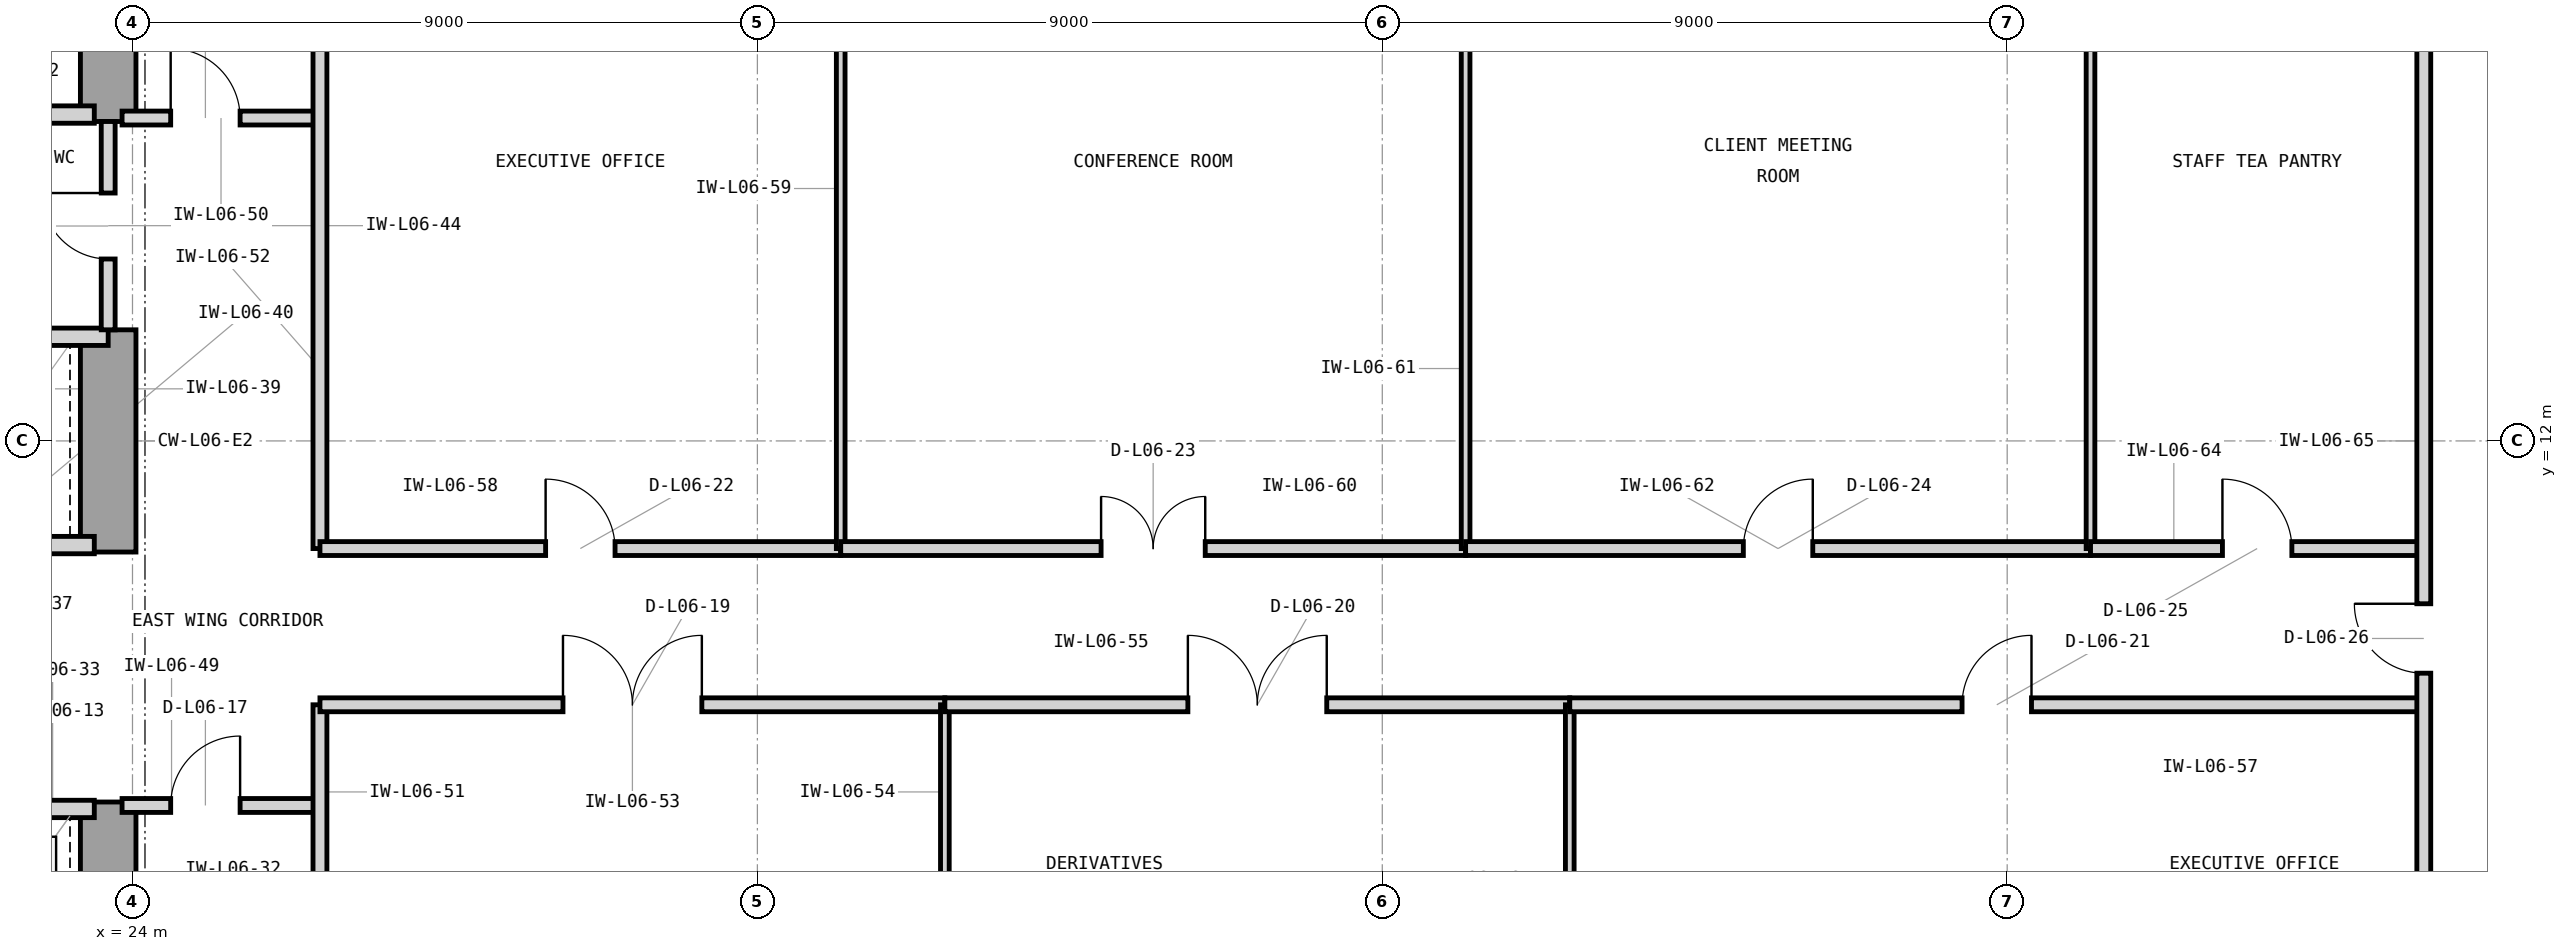
"""IFC4 building model, lengths in metres.
Left out: names, types, materials, properties, quantities, classifications, styles, units other than length and angle.
Written with IfcOpenShell. Run it as: python <this file> out.ifc"""

import sys

from ifc_helpers import new_model, si_unit, direction, frame, frame_2d, origin, place, context, subcontext, project, spatial, rectangle, extrude, element, fill, save


model = new_model("IFC4")
c1 = context("Model", 3, precision=1e-05, world=origin(), true_north=direction((0.0, 1.0)))
c2 = subcontext(c1, "Body", "Model", "MODEL_VIEW")
j1 = project(units=[si_unit("LENGTHUNIT", "METRE"), si_unit("PLANEANGLEUNIT", "RADIAN")], contexts=[c1])
p1 = place(None, origin())
s1 = spatial("IfcSite", under=j1, at=p1, CompositionType="ELEMENT")
p2 = place(p1, origin())
s2 = spatial("IfcBuilding", under=s1, at=p2, CompositionType="ELEMENT")
p3 = place(p2, frame((0.0, 0.0, 30.0)))
s3 = spatial("IfcBuildingStorey", under=s2, at=p3, CompositionType="ELEMENT", Elevation=30.0)
p4 = place(p3, frame((23.65, 3.75, 0.0), z_axis=(0.0, 0.0, 1.0), x_axis=(0.0, 1.0, 0.0)))
e1 = element("IfcWall", 1, at=p4, inside=s3, PredefinedType="SHEAR", context=c2, shape_type="SweptSolid", body=[
    extrude(rectangle(XDim=3.05, YDim=0.8, at=frame_2d((1.525, 0.0))), origin(), (0.0, 0.0, 1.0), 4.2),
])
p5 = place(p3, frame((23.65, 10.4, 0.0), z_axis=(0.0, 0.0, 1.0), x_axis=(0.0, 1.0, 0.0)))
e2 = element("IfcWall", 2, at=p5, inside=s3, PredefinedType="SHEAR", context=c2, shape_type="SweptSolid", body=[
    extrude(rectangle(XDim=3.2, YDim=0.8, at=frame_2d((1.6, 0.0))), origin(), (0.0, 0.0, 1.0), 4.2),
])
p6 = place(p3, frame((23.65, 16.6, 0.0), z_axis=(0.0, 0.0, 1.0), x_axis=(0.0, 1.0, 0.0)))
e3 = element("IfcWall", 3, at=p6, inside=s3, PredefinedType="SHEAR", context=c2, shape_type="SweptSolid", body=[
    extrude(rectangle(XDim=4.05, YDim=0.8, at=frame_2d((2.025, 0.0))), origin(), (0.0, 0.0, 1.0), 4.2),
])
p7 = place(p3, frame((21.05, 16.7, 0.0), z_axis=(0.0, 0.0, 1.0), x_axis=(1.0, 0.0, 0.0)))
e4 = element("IfcWall", 4, at=p7, inside=s3, PredefinedType="PARTITIONING", context=c2, shape_type="SweptSolid", body=[
    extrude(rectangle(XDim=2.4, YDim=0.25, at=frame_2d((1.2, 0.0))), origin(), (0.0, 0.0, 1.0), 3.426),
])
p8 = place(p3, frame((21.05, 6.7, 0.0), z_axis=(0.0, 0.0, 1.0), x_axis=(1.0, 0.0, 0.0)))
e5 = element("IfcWall", 5, at=p8, inside=s3, PredefinedType="PARTITIONING", context=c2, shape_type="SweptSolid", body=[
    extrude(rectangle(XDim=2.4, YDim=0.25, at=frame_2d((1.2, 0.0))), origin(), (0.0, 0.0, 1.0), 3.426),
])
p9 = place(p8, frame((0.48, 0.0, 0.0)))
e6 = element("IfcOpeningElement", 6, at=p9, cuts=e5, PredefinedType="OPENING", context=c2, shape_type="SweptSolid", body=[
    extrude(rectangle(XDim=1.15, YDim=2.25, at=frame_2d((0.575, 1.125))), frame((0.0, 0.135, 0.0), z_axis=(0.0, -1.0, 0.0), x_axis=(1.0, 0.0, 0.0)), (0.0, 0.0, 1.0), 0.27),
])
p10 = place(p3, frame((21.05, 10.5, 0.0), z_axis=(0.0, 0.0, 1.0), x_axis=(1.0, 0.0, 0.0)))
e7 = element("IfcWall", 7, at=p10, inside=s3, PredefinedType="PARTITIONING", context=c2, shape_type="SweptSolid", body=[
    extrude(rectangle(XDim=2.4, YDim=0.25, at=frame_2d((1.2, 0.0))), origin(), (0.0, 0.0, 1.0), 3.426),
])
p11 = place(p3, frame((14.7, 13.5, 0.0), z_axis=(0.0, 0.0, 1.0), x_axis=(1.0, 0.0, 0.0)))
e8 = element("IfcWall", 8, at=p11, inside=s3, PredefinedType="PARTITIONING", context=c2, shape_type="SweptSolid", body=[
    extrude(rectangle(XDim=8.95, YDim=0.25, at=frame_2d((4.475, 0.0))), origin(), (0.0, 0.0, 1.0), 3.426),
])
p12 = place(p3, frame((23.65, 13.6, 0.0), z_axis=(0.0, 0.0, 1.0), x_axis=(0.0, 1.0, 0.0)))
e9 = element("IfcWall", 9, at=p12, inside=s3, PredefinedType="PARTITIONING", context=c2, shape_type="SweptSolid", body=[
    extrude(rectangle(XDim=3.0, YDim=0.2, at=frame_2d((1.5, 0.0))), origin(), (0.0, 0.0, 1.0), 3.97),
])
p13 = place(p12, frame((1.02, 0.0, 0.0)))
e10 = element("IfcOpeningElement", 10, at=p13, cuts=e9, PredefinedType="OPENING", context=c2, shape_type="SweptSolid", body=[
    extrude(rectangle(XDim=0.95, YDim=2.1, at=frame_2d((0.475, 1.05))), frame((0.0, 0.11, 0.0), z_axis=(0.0, -1.0, 0.0), x_axis=(1.0, 0.0, 0.0)), (0.0, 0.0, 1.0), 0.22),
])
p14 = place(p3, frame((23.85, 6.75, 0.0), z_axis=(0.0, 0.0, 1.0), x_axis=(1.0, 0.0, 0.0)))
e11 = element("IfcWall", 11, at=p14, inside=s3, PredefinedType="PARTITIONING", context=c2, shape_type="SweptSolid", body=[
    extrude(rectangle(XDim=2.85, YDim=0.2, at=frame_2d((1.425, 0.0))), origin(), (0.0, 0.0, 1.0), 3.97),
])
p15 = place(p14, frame((0.7, 0.0, 0.0)))
e12 = element("IfcOpeningElement", 12, at=p15, cuts=e11, PredefinedType="OPENING", context=c2, shape_type="SweptSolid", body=[
    extrude(rectangle(XDim=1.0, YDim=2.15, at=frame_2d((0.5, 1.075))), frame((0.0, 0.11, 0.0), z_axis=(0.0, -1.0, 0.0), x_axis=(1.0, 0.0, 0.0)), (0.0, 0.0, 1.0), 0.22),
])
p16 = place(p3, frame((23.85, 16.65, 0.0), z_axis=(0.0, 0.0, 1.0), x_axis=(1.0, 0.0, 0.0)))
e13 = element("IfcWall", 13, at=p16, inside=s3, PredefinedType="PARTITIONING", context=c2, shape_type="SweptSolid", body=[
    extrude(rectangle(XDim=2.85, YDim=0.2, at=frame_2d((1.425, 0.0))), origin(), (0.0, 0.0, 1.0), 3.97),
])
p17 = place(p16, frame((0.7, 0.0, 0.0)))
e14 = element("IfcOpeningElement", 14, at=p17, cuts=e13, PredefinedType="OPENING", context=c2, shape_type="SweptSolid", body=[
    extrude(rectangle(XDim=1.0, YDim=2.15, at=frame_2d((0.5, 1.075))), frame((0.0, 0.11, 0.0), z_axis=(0.0, -1.0, 0.0), x_axis=(1.0, 0.0, 0.0)), (0.0, 0.0, 1.0), 0.22),
])
p18 = place(p3, frame((26.7, 3.18, 0.0), z_axis=(0.0, 0.0, 1.0), x_axis=(0.0, 1.0, 0.0)))
e15 = element("IfcWall", 15, at=p18, inside=s3, PredefinedType="PARTITIONING", context=c2, shape_type="SweptSolid", body=[
    extrude(rectangle(XDim=5.02, YDim=0.2, at=frame_2d((2.51, 0.0))), origin(), (0.0, 0.0, 1.0), 3.97),
])
p19 = place(p3, frame((26.7, 10.45, 0.0), z_axis=(0.0, 0.0, 1.0), x_axis=(0.0, 1.0, 0.0)))
e16 = element("IfcWall", 16, at=p19, inside=s3, PredefinedType="PARTITIONING", context=c2, shape_type="SweptSolid", body=[
    extrude(rectangle(XDim=10.37, YDim=0.2, at=frame_2d((5.185, 0.0))), origin(), (0.0, 0.0, 1.0), 3.97),
])
p20 = place(p3, frame((26.7, 8.2, 0.0), z_axis=(0.0, 0.0, 1.0), x_axis=(1.0, 0.0, 0.0)))
e17 = element("IfcWall", 17, at=p20, inside=s3, PredefinedType="PARTITIONING", context=c2, shape_type="SweptSolid", body=[
    extrude(rectangle(XDim=9.0, YDim=0.2, at=frame_2d((4.5, 0.0))), origin(), (0.0, 0.0, 1.0), 3.97),
])
p21 = place(p20, frame((3.5, 0.0, 0.0)))
e18 = element("IfcOpeningElement", 18, at=p21, cuts=e17, PredefinedType="OPENING", context=c2, shape_type="SweptSolid", body=[
    extrude(rectangle(XDim=2.0, YDim=2.5, at=frame_2d((1.0, 1.25))), frame((0.0, 0.11, 0.0), z_axis=(0.0, -1.0, 0.0), x_axis=(1.0, 0.0, 0.0)), (0.0, 0.0, 1.0), 0.22),
])
p22 = place(p3, frame((35.7, 3.18, 0.0), z_axis=(0.0, 0.0, 1.0), x_axis=(0.0, 1.0, 0.0)))
e19 = element("IfcWall", 19, at=p22, inside=s3, PredefinedType="PARTITIONING", context=c2, shape_type="SweptSolid", body=[
    extrude(rectangle(XDim=5.02, YDim=0.125, at=frame_2d((2.51, 0.0))), origin(), (0.0, 0.0, 1.0), 3.97),
])
p23 = place(p3, frame((35.7, 8.2, 0.0), z_axis=(0.0, 0.0, 1.0), x_axis=(1.0, 0.0, 0.0)))
e20 = element("IfcWall", 20, at=p23, inside=s3, PredefinedType="PARTITIONING", context=c2, shape_type="SweptSolid", body=[
    extrude(rectangle(XDim=9.0, YDim=0.2, at=frame_2d((4.5, 0.0))), origin(), (0.0, 0.0, 1.0), 3.97),
])
p24 = place(p23, frame((3.5, 0.0, 0.0)))
e21 = element("IfcOpeningElement", 21, at=p24, cuts=e20, PredefinedType="OPENING", context=c2, shape_type="SweptSolid", body=[
    extrude(rectangle(XDim=2.0, YDim=2.5, at=frame_2d((1.0, 1.25))), frame((0.0, 0.11, 0.0), z_axis=(0.0, -1.0, 0.0), x_axis=(1.0, 0.0, 0.0)), (0.0, 0.0, 1.0), 0.22),
])
p25 = place(p3, frame((44.7, 3.18, 0.0), z_axis=(0.0, 0.0, 1.0), x_axis=(0.0, 1.0, 0.0)))
e22 = element("IfcWall", 22, at=p25, inside=s3, PredefinedType="PARTITIONING", context=c2, shape_type="SweptSolid", body=[
    extrude(rectangle(XDim=5.02, YDim=0.125, at=frame_2d((2.51, 0.0))), origin(), (0.0, 0.0, 1.0), 3.97),
])
p26 = place(p3, frame((44.7, 8.2, 0.0), z_axis=(0.0, 0.0, 1.0), x_axis=(1.0, 0.0, 0.0)))
e23 = element("IfcWall", 23, at=p26, inside=s3, PredefinedType="PARTITIONING", context=c2, shape_type="SweptSolid", body=[
    extrude(rectangle(XDim=12.3, YDim=0.2, at=frame_2d((6.15, 0.0))), origin(), (0.0, 0.0, 1.0), 3.97),
])
p27 = place(p26, frame((5.65, 0.0, 0.0)))
e24 = element("IfcOpeningElement", 24, at=p27, cuts=e23, PredefinedType="OPENING", context=c2, shape_type="SweptSolid", body=[
    extrude(rectangle(XDim=1.0, YDim=2.15, at=frame_2d((0.5, 1.075))), frame((0.0, 0.11, 0.0), z_axis=(0.0, -1.0, 0.0), x_axis=(1.0, 0.0, 0.0)), (0.0, 0.0, 1.0), 0.22),
])
p28 = place(p3, frame((26.7, 10.45, 0.0), z_axis=(0.0, 0.0, 1.0), x_axis=(1.0, 0.0, 0.0)))
e25 = element("IfcWall", 25, at=p28, inside=s3, PredefinedType="PARTITIONING", context=c2, shape_type="SweptSolid", body=[
    extrude(rectangle(XDim=7.5, YDim=0.2, at=frame_2d((3.75, 0.0))), origin(), (0.0, 0.0, 1.0), 3.97),
])
p29 = place(p28, frame((3.25, 0.0, 0.0)))
e26 = element("IfcOpeningElement", 26, at=p29, cuts=e25, PredefinedType="OPENING", context=c2, shape_type="SweptSolid", body=[
    extrude(rectangle(XDim=1.0, YDim=2.15, at=frame_2d((0.5, 1.075))), frame((0.0, 0.11, 0.0), z_axis=(0.0, -1.0, 0.0), x_axis=(1.0, 0.0, 0.0)), (0.0, 0.0, 1.0), 0.22),
])
p30 = place(p3, frame((34.2, 10.45, 0.0), z_axis=(0.0, 0.0, 1.0), x_axis=(0.0, 1.0, 0.0)))
e27 = element("IfcWall", 27, at=p30, inside=s3, PredefinedType="PARTITIONING", context=c2, shape_type="SweptSolid", body=[
    extrude(rectangle(XDim=10.37, YDim=0.125, at=frame_2d((5.185, 0.0))), origin(), (0.0, 0.0, 1.0), 3.97),
])
p31 = place(p3, frame((34.2, 10.45, 0.0), z_axis=(0.0, 0.0, 1.0), x_axis=(1.0, 0.0, 0.0)))
e28 = element("IfcWall", 28, at=p31, inside=s3, PredefinedType="PARTITIONING", context=c2, shape_type="SweptSolid", body=[
    extrude(rectangle(XDim=9.0, YDim=0.2, at=frame_2d((4.5, 0.0))), origin(), (0.0, 0.0, 1.0), 3.97),
])
p32 = place(p31, frame((3.75, 0.0, 0.0)))
e29 = element("IfcOpeningElement", 29, at=p32, cuts=e28, PredefinedType="OPENING", context=c2, shape_type="SweptSolid", body=[
    extrude(rectangle(XDim=1.5, YDim=2.3, at=frame_2d((0.75, 1.15))), frame((0.0, 0.11, 0.0), z_axis=(0.0, -1.0, 0.0), x_axis=(1.0, 0.0, 0.0)), (0.0, 0.0, 1.0), 0.22),
])
p33 = place(p3, frame((43.2, 10.45, 0.0), z_axis=(0.0, 0.0, 1.0), x_axis=(0.0, 1.0, 0.0)))
e30 = element("IfcWall", 30, at=p33, inside=s3, PredefinedType="PARTITIONING", context=c2, shape_type="SweptSolid", body=[
    extrude(rectangle(XDim=10.37, YDim=0.125, at=frame_2d((5.185, 0.0))), origin(), (0.0, 0.0, 1.0), 3.97),
])
p34 = place(p3, frame((43.2, 10.45, 0.0), z_axis=(0.0, 0.0, 1.0), x_axis=(1.0, 0.0, 0.0)))
e31 = element("IfcWall", 31, at=p34, inside=s3, PredefinedType="PARTITIONING", context=c2, shape_type="SweptSolid", body=[
    extrude(rectangle(XDim=9.0, YDim=0.2, at=frame_2d((4.5, 0.0))), origin(), (0.0, 0.0, 1.0), 3.97),
])
p35 = place(p34, frame((4.0, 0.0, 0.0)))
e32 = element("IfcOpeningElement", 32, at=p35, cuts=e31, PredefinedType="OPENING", context=c2, shape_type="SweptSolid", body=[
    extrude(rectangle(XDim=1.0, YDim=2.15, at=frame_2d((0.5, 1.075))), frame((0.0, 0.11, 0.0), z_axis=(0.0, -1.0, 0.0), x_axis=(1.0, 0.0, 0.0)), (0.0, 0.0, 1.0), 0.22),
])
p36 = place(p3, frame((52.2, 10.45, 0.0), z_axis=(0.0, 0.0, 1.0), x_axis=(0.0, 1.0, 0.0)))
e33 = element("IfcWall", 33, at=p36, inside=s3, PredefinedType="PARTITIONING", context=c2, shape_type="SweptSolid", body=[
    extrude(rectangle(XDim=10.37, YDim=0.125, at=frame_2d((5.185, 0.0))), origin(), (0.0, 0.0, 1.0), 3.97),
])
p37 = place(p3, frame((52.2, 10.45, 0.0), z_axis=(0.0, 0.0, 1.0), x_axis=(1.0, 0.0, 0.0)))
e34 = element("IfcWall", 34, at=p37, inside=s3, PredefinedType="PARTITIONING", context=c2, shape_type="SweptSolid", body=[
    extrude(rectangle(XDim=4.8, YDim=0.2, at=frame_2d((2.4, 0.0))), origin(), (0.0, 0.0, 1.0), 3.97),
])
p38 = place(p37, frame((1.9, 0.0, 0.0)))
e35 = element("IfcOpeningElement", 35, at=p38, cuts=e34, PredefinedType="OPENING", context=c2, shape_type="SweptSolid", body=[
    extrude(rectangle(XDim=1.0, YDim=2.15, at=frame_2d((0.5, 1.075))), frame((0.0, 0.11, 0.0), z_axis=(0.0, -1.0, 0.0), x_axis=(1.0, 0.0, 0.0)), (0.0, 0.0, 1.0), 0.22),
])
p39 = place(p3, frame((57.0, 3.18, 0.0), z_axis=(0.0, 0.0, 1.0), x_axis=(0.0, 1.0, 0.0)))
e36 = element("IfcWall", 36, at=p39, inside=s3, PredefinedType="PARTITIONING", context=c2, shape_type="SweptSolid", body=[
    extrude(rectangle(XDim=17.64, YDim=0.2, at=frame_2d((8.82, 0.0))), origin(), (0.0, 0.0, 1.0), 3.114),
])
p40 = place(p39, frame((5.475, 0.0, 0.0)))
e37 = element("IfcOpeningElement", 37, at=p40, cuts=e36, PredefinedType="OPENING", context=c2, shape_type="SweptSolid", body=[
    extrude(rectangle(XDim=1.0, YDim=2.15, at=frame_2d((0.5, 1.075))), frame((0.0, 0.11, 0.0), z_axis=(0.0, -1.0, 0.0), x_axis=(1.0, 0.0, 0.0)), (0.0, 0.0, 1.0), 0.22),
])
p41 = place(p13, origin())
e38 = element("IfcDoor", 38, at=p41, inside=s3, OperationType="SINGLE_SWING_RIGHT", PredefinedType="DOOR", context=c2, shape_type="SweptSolid", body=[
    extrude(rectangle(XDim=0.95, YDim=2.1, at=frame_2d((0.475, 1.05))), frame((0.0, 0.025, 0.0), z_axis=(0.0, -1.0, 0.0), x_axis=(1.0, 0.0, 0.0)), (0.0, 0.0, 1.0), 0.05),
])
fill(e10, e38)
p42 = place(p15, origin())
e39 = element("IfcDoor", 39, at=p42, inside=s3, OperationType="SINGLE_SWING_RIGHT", PredefinedType="DOOR", context=c2, shape_type="SweptSolid", body=[
    extrude(rectangle(XDim=1.0, YDim=2.15, at=frame_2d((0.5, 1.075))), frame((0.0, 0.025, 0.0), z_axis=(0.0, -1.0, 0.0), x_axis=(1.0, 0.0, 0.0)), (0.0, 0.0, 1.0), 0.05),
])
fill(e12, e39)
p43 = place(p17, origin())
e40 = element("IfcDoor", 40, at=p43, inside=s3, OperationType="SINGLE_SWING_LEFT", PredefinedType="DOOR", context=c2, shape_type="SweptSolid", body=[
    extrude(rectangle(XDim=1.0, YDim=2.15, at=frame_2d((0.5, 1.075))), frame((0.0, 0.025, 0.0), z_axis=(0.0, -1.0, 0.0), x_axis=(1.0, 0.0, 0.0)), (0.0, 0.0, 1.0), 0.05),
])
fill(e14, e40)
p44 = place(p21, origin())
e41 = element("IfcDoor", 41, at=p44, inside=s3, OperationType="DOUBLE_DOOR_SINGLE_SWING", PredefinedType="DOOR", context=c2, shape_type="SweptSolid", body=[
    extrude(rectangle(XDim=2.0, YDim=2.5, at=frame_2d((1.0, 1.25))), frame((0.0, 0.025, 0.0), z_axis=(0.0, -1.0, 0.0), x_axis=(1.0, 0.0, 0.0)), (0.0, 0.0, 1.0), 0.05),
])
fill(e18, e41)
p45 = place(p24, origin())
e42 = element("IfcDoor", 42, at=p45, inside=s3, OperationType="DOUBLE_DOOR_SINGLE_SWING", PredefinedType="DOOR", context=c2, shape_type="SweptSolid", body=[
    extrude(rectangle(XDim=2.0, YDim=2.5, at=frame_2d((1.0, 1.25))), frame((0.0, 0.025, 0.0), z_axis=(0.0, -1.0, 0.0), x_axis=(1.0, 0.0, 0.0)), (0.0, 0.0, 1.0), 0.05),
])
fill(e21, e42)
p46 = place(p27, origin())
e43 = element("IfcDoor", 43, at=p46, inside=s3, OperationType="SINGLE_SWING_RIGHT", PredefinedType="DOOR", context=c2, shape_type="SweptSolid", body=[
    extrude(rectangle(XDim=1.0, YDim=2.15, at=frame_2d((0.5, 1.075))), frame((0.0, 0.025, 0.0), z_axis=(0.0, -1.0, 0.0), x_axis=(1.0, 0.0, 0.0)), (0.0, 0.0, 1.0), 0.05),
])
fill(e24, e43)
p47 = place(p29, origin())
e44 = element("IfcDoor", 44, at=p47, inside=s3, OperationType="SINGLE_SWING_LEFT", PredefinedType="DOOR", context=c2, shape_type="SweptSolid", body=[
    extrude(rectangle(XDim=1.0, YDim=2.15, at=frame_2d((0.5, 1.075))), frame((0.0, 0.025, 0.0), z_axis=(0.0, -1.0, 0.0), x_axis=(1.0, 0.0, 0.0)), (0.0, 0.0, 1.0), 0.05),
])
fill(e26, e44)
p48 = place(p32, origin())
e45 = element("IfcDoor", 45, at=p48, inside=s3, OperationType="DOUBLE_DOOR_SINGLE_SWING", PredefinedType="DOOR", context=c2, shape_type="SweptSolid", body=[
    extrude(rectangle(XDim=1.5, YDim=2.3, at=frame_2d((0.75, 1.15))), frame((0.0, 0.025, 0.0), z_axis=(0.0, -1.0, 0.0), x_axis=(1.0, 0.0, 0.0)), (0.0, 0.0, 1.0), 0.05),
])
fill(e29, e45)
p49 = place(p35, origin())
e46 = element("IfcDoor", 46, at=p49, inside=s3, OperationType="SINGLE_SWING_RIGHT", PredefinedType="DOOR", context=c2, shape_type="SweptSolid", body=[
    extrude(rectangle(XDim=1.0, YDim=2.15, at=frame_2d((0.5, 1.075))), frame((0.0, 0.025, 0.0), z_axis=(0.0, -1.0, 0.0), x_axis=(1.0, 0.0, 0.0)), (0.0, 0.0, 1.0), 0.05),
])
fill(e32, e46)
p50 = place(p38, origin())
e47 = element("IfcDoor", 47, at=p50, inside=s3, OperationType="SINGLE_SWING_LEFT", PredefinedType="DOOR", context=c2, shape_type="SweptSolid", body=[
    extrude(rectangle(XDim=1.0, YDim=2.15, at=frame_2d((0.5, 1.075))), frame((0.0, 0.025, 0.0), z_axis=(0.0, -1.0, 0.0), x_axis=(1.0, 0.0, 0.0)), (0.0, 0.0, 1.0), 0.05),
])
fill(e35, e47)
p51 = place(p40, origin())
e48 = element("IfcDoor", 48, at=p51, inside=s3, OperationType="SINGLE_SWING_RIGHT", PredefinedType="DOOR", context=c2, shape_type="SweptSolid", body=[
    extrude(rectangle(XDim=1.0, YDim=2.15, at=frame_2d((0.5, 1.075))), frame((0.0, 0.025, 0.0), z_axis=(0.0, -1.0, 0.0), x_axis=(1.0, 0.0, 0.0)), (0.0, 0.0, 1.0), 0.05),
])
fill(e37, e48)
save(model, sys.argv[1])
